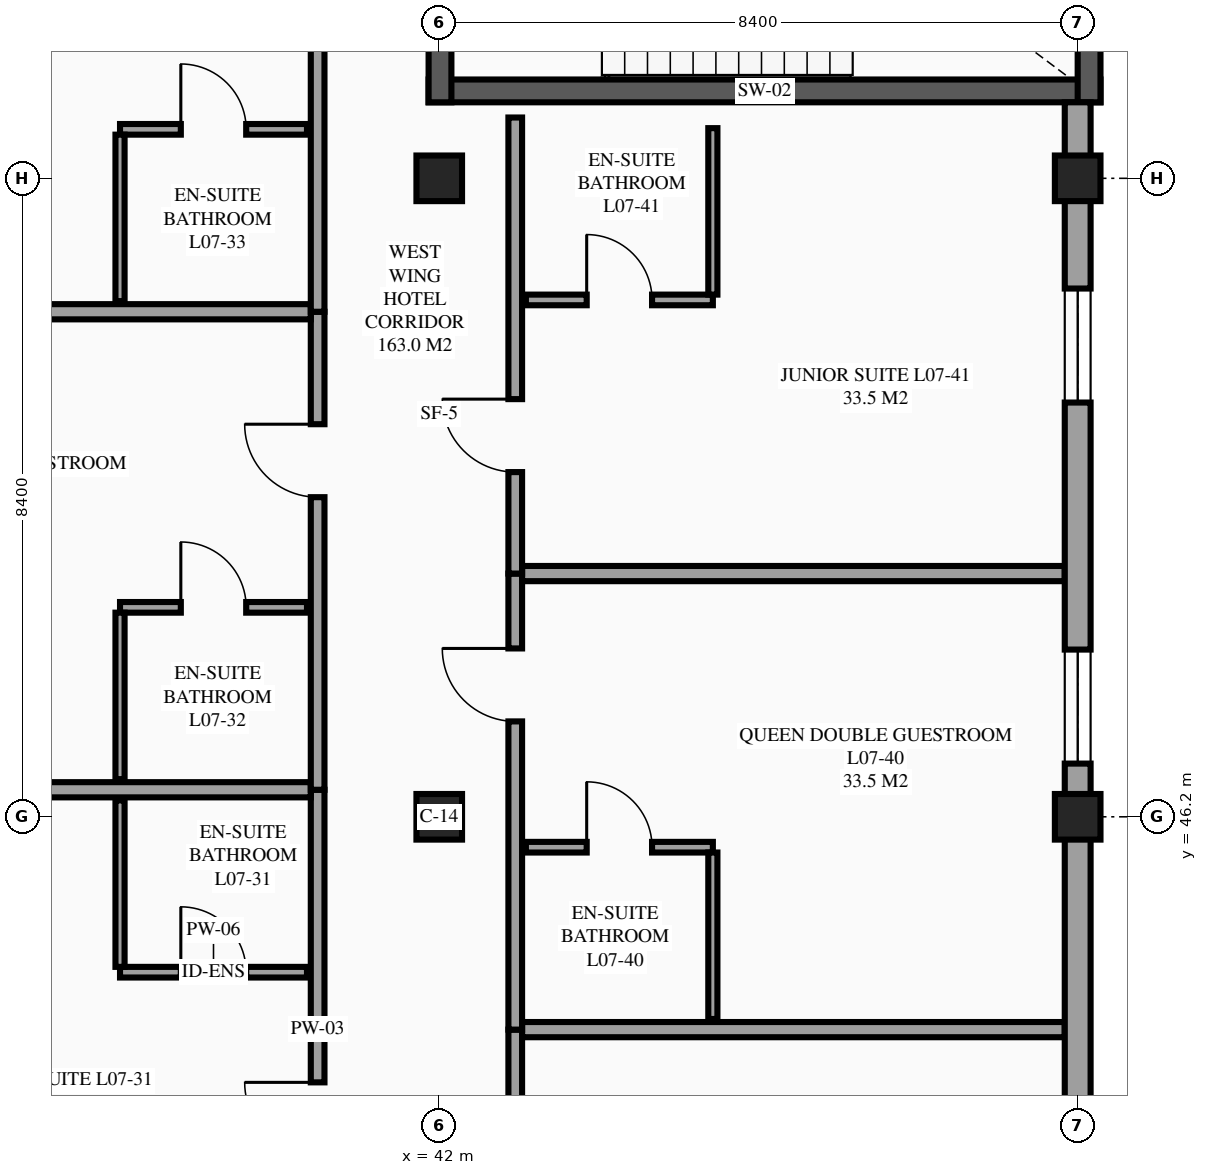
"""IFC4 building model, lengths in metres.
Left out: names, types, materials, properties, quantities, classifications, styles, units other than length and angle.
Written with IfcOpenShell. Run it as: python <this file> out.ifc"""

import sys

from ifc_helpers import new_model, si_unit, direction, frame, frame_2d, origin, origin_2d, place, context, subcontext, project, spatial, rectangle, extrude, element, fill, save


model = new_model("IFC4")
c1 = context("Model", 3, precision=1e-05, world=origin(), true_north=direction((0.0, 1.0)))
c2 = subcontext(c1, "Body", "Model", "MODEL_VIEW")
j1 = project(units=[si_unit("LENGTHUNIT", "METRE"), si_unit("PLANEANGLEUNIT", "RADIAN")], contexts=[c1])
p1 = place(None, origin())
s1 = spatial("IfcSite", under=j1, at=p1, CompositionType="ELEMENT")
p2 = place(p1, origin())
s2 = spatial("IfcBuilding", under=s1, at=p2, CompositionType="ELEMENT")
p3 = place(p2, frame((0.0, 0.0, 29.1)))
s3 = spatial("IfcBuildingStorey", under=s2, at=p3, CompositionType="ELEMENT", Elevation=29.1)
for number, where, z_axis, x_axis in (
    (1, (42.0, 46.2, 0.0), (0.0, 0.0, 1.0), (1.0, 0.0, 0.0)),
    (2, (42.0, 54.6, 0.0), (0.0, 0.0, 1.0), (1.0, 0.0, 0.0)),
    (3, (50.4, 46.2, 0.0), (0.0, 0.0, 1.0), (1.0, 0.0, 0.0)),
    (4, (50.4, 54.6, 0.0), (0.0, 0.0, 1.0), (1.0, 0.0, 0.0)),
):
    element("IfcColumn", number, at=place(p3, frame(where, z_axis=z_axis, x_axis=x_axis)), inside=s3, PredefinedType="COLUMN", context=c2, shape_type="SweptSolid", body=[
        extrude(rectangle(XDim=0.6, YDim=0.6, at=origin_2d()), origin(), (0.0, 0.0, 1.0), 3.6),
    ])
p4 = place(p3, frame((41.86, 55.75, 0.0), z_axis=(0.0, 0.0, 1.0), x_axis=(1.0, 0.0, 0.0)))
e5 = element("IfcWall", 5, at=p4, inside=s3, PredefinedType="SHEAR", context=c2, shape_type="SweptSolid", body=[
    extrude(rectangle(XDim=8.84, YDim=0.3, at=frame_2d((4.42, 0.0))), origin(), (0.0, 0.0, 1.0), 3.6),
])
p5 = place(p3, frame((50.55, 55.6, 0.0), z_axis=(0.0, 0.0, 1.0), x_axis=(0.0, 1.0, 0.0)))
e6 = element("IfcWall", 6, at=p5, inside=s3, PredefinedType="SHEAR", context=c2, shape_type="SweptSolid", body=[
    extrude(rectangle(XDim=5.2, YDim=0.3, at=frame_2d((2.6, 0.0))), origin(), (0.0, 0.0, 1.0), 3.6),
])
p6 = place(p3, frame((42.01, 60.8, 0.0), z_axis=(0.0, 0.0, 1.0), x_axis=(0.0, -1.0, 0.0)))
e7 = element("IfcWall", 7, at=p6, inside=s3, PredefinedType="SHEAR", context=c2, shape_type="SweptSolid", body=[
    extrude(rectangle(XDim=5.2, YDim=0.3, at=frame_2d((2.6, 0.0))), origin(), (0.0, 0.0, 1.0), 3.6),
])
p7 = place(p6, frame((3.0, 0.0, 0.0)))
e8 = element("IfcOpeningElement", 8, at=p7, cuts=e7, PredefinedType="OPENING", context=c2, shape_type="SweptSolid", body=[
    extrude(rectangle(XDim=1.15, YDim=2.15, at=frame_2d((0.575, 1.075))), frame((0.0, 0.16, 0.0), z_axis=(0.0, -1.0, 0.0), x_axis=(1.0, 0.0, 0.0)), (0.0, 0.0, 1.0), 0.32),
])
p8 = place(p3, frame((40.4, 40.267, 0.0), z_axis=(0.0, 0.0, 1.0), x_axis=(0.0, 1.0, 0.0)))
e9 = element("IfcWall", 9, at=p8, inside=s3, PredefinedType="PARTITIONING", context=c2, shape_type="SweptSolid", body=[
    extrude(rectangle(XDim=6.289, YDim=0.18, at=frame_2d((3.145, 0.0))), origin(), (0.0, 0.0, 1.0), 3.375),
])
p9 = place(p8, frame((1.479, 0.0, 0.0)))
e10 = element("IfcOpeningElement", 10, at=p9, cuts=e9, PredefinedType="OPENING", context=c2, shape_type="SweptSolid", body=[
    extrude(rectangle(XDim=0.96, YDim=2.15, at=frame_2d((0.48, 1.075))), frame((0.0, 0.1, 0.0), z_axis=(0.0, -1.0, 0.0), x_axis=(1.0, 0.0, 0.0)), (0.0, 0.0, 1.0), 0.2),
])
p10 = place(p3, frame((34.05, 46.556, 0.0), z_axis=(0.0, 0.0, 1.0), x_axis=(1.0, 0.0, 0.0)))
e11 = element("IfcWall", 11, at=p10, inside=s3, PredefinedType="PARTITIONING", context=c2, shape_type="SweptSolid", body=[
    extrude(rectangle(XDim=6.26, YDim=0.2, at=frame_2d((3.13, 0.0))), origin(), (0.0, 0.0, 1.0), 3.375),
])
p11 = place(p3, frame((37.8, 44.156, 0.0), z_axis=(0.0, 0.0, 1.0), x_axis=(1.0, 0.0, 0.0)))
e12 = element("IfcWall", 12, at=p11, inside=s3, PredefinedType="PARTITIONING", context=c2, shape_type="SweptSolid", body=[
    extrude(rectangle(XDim=2.46, YDim=0.14, at=frame_2d((1.23, 0.0))), origin(), (0.0, 0.0, 1.0), 3.375),
])
p12 = place(p11, frame((0.8, 0.0, 0.0)))
e13 = element("IfcOpeningElement", 13, at=p12, cuts=e12, PredefinedType="OPENING", context=c2, shape_type="SweptSolid", body=[
    extrude(rectangle(XDim=0.86, YDim=2.1, at=frame_2d((0.43, 1.05))), frame((0.0, 0.08, 0.0), z_axis=(0.0, -1.0, 0.0), x_axis=(1.0, 0.0, 0.0)), (0.0, 0.0, 1.0), 0.16),
])
p13 = place(p3, frame((37.8, 44.226, 0.0), z_axis=(0.0, 0.0, 1.0), x_axis=(0.0, 1.0, 0.0)))
e14 = element("IfcWall", 14, at=p13, inside=s3, PredefinedType="PARTITIONING", context=c2, shape_type="SweptSolid", body=[
    extrude(rectangle(XDim=2.19, YDim=0.12, at=frame_2d((1.095, 0.0))), origin(), (0.0, 0.0, 1.0), 3.375),
])
p14 = place(p3, frame((40.4, 46.556, 0.0), z_axis=(0.0, 0.0, 1.0), x_axis=(0.0, 1.0, 0.0)))
e15 = element("IfcWall", 15, at=p14, inside=s3, PredefinedType="PARTITIONING", context=c2, shape_type="SweptSolid", body=[
    extrude(rectangle(XDim=6.289, YDim=0.18, at=frame_2d((3.145, 0.0))), origin(), (0.0, 0.0, 1.0), 3.375),
])
p15 = place(p14, frame((3.849, 0.0, 0.0)))
e16 = element("IfcOpeningElement", 16, at=p15, cuts=e15, PredefinedType="OPENING", context=c2, shape_type="SweptSolid", body=[
    extrude(rectangle(XDim=0.96, YDim=2.15, at=frame_2d((0.48, 1.075))), frame((0.0, 0.1, 0.0), z_axis=(0.0, -1.0, 0.0), x_axis=(1.0, 0.0, 0.0)), (0.0, 0.0, 1.0), 0.2),
])
p16 = place(p3, frame((33.77, 52.844, 0.0), z_axis=(0.0, 0.0, 1.0), x_axis=(1.0, 0.0, 0.0)))
e17 = element("IfcWall", 17, at=p16, inside=s3, PredefinedType="PARTITIONING", context=c2, shape_type="SweptSolid", body=[
    extrude(rectangle(XDim=6.54, YDim=0.2, at=frame_2d((3.27, 0.0))), origin(), (0.0, 0.0, 1.0), 3.375),
])
p17 = place(p3, frame((37.8, 48.956, 0.0), z_axis=(0.0, 0.0, 1.0), x_axis=(1.0, 0.0, 0.0)))
e18 = element("IfcWall", 18, at=p17, inside=s3, PredefinedType="PARTITIONING", context=c2, shape_type="SweptSolid", body=[
    extrude(rectangle(XDim=2.46, YDim=0.14, at=frame_2d((1.23, 0.0))), origin(), (0.0, 0.0, 1.0), 3.375),
])
p18 = place(p17, frame((0.8, 0.0, 0.0)))
e19 = element("IfcOpeningElement", 19, at=p18, cuts=e18, PredefinedType="OPENING", context=c2, shape_type="SweptSolid", body=[
    extrude(rectangle(XDim=0.86, YDim=2.1, at=frame_2d((0.43, 1.05))), frame((0.0, 0.08, 0.0), z_axis=(0.0, -1.0, 0.0), x_axis=(1.0, 0.0, 0.0)), (0.0, 0.0, 1.0), 0.16),
])
p19 = place(p3, frame((37.8, 46.696, 0.0), z_axis=(0.0, 0.0, 1.0), x_axis=(0.0, 1.0, 0.0)))
e20 = element("IfcWall", 20, at=p19, inside=s3, PredefinedType="PARTITIONING", context=c2, shape_type="SweptSolid", body=[
    extrude(rectangle(XDim=2.19, YDim=0.12, at=frame_2d((1.095, 0.0))), origin(), (0.0, 0.0, 1.0), 3.375),
])
p20 = place(p3, frame((40.4, 52.844, 0.0), z_axis=(0.0, 0.0, 1.0), x_axis=(0.0, 1.0, 0.0)))
e21 = element("IfcWall", 21, at=p20, inside=s3, PredefinedType="PARTITIONING", context=c2, shape_type="SweptSolid", body=[
    extrude(rectangle(XDim=6.289, YDim=0.18, at=frame_2d((3.145, 0.0))), origin(), (0.0, 0.0, 1.0), 3.375),
])
p21 = place(p20, frame((3.85, 0.0, 0.0)))
e22 = element("IfcOpeningElement", 22, at=p21, cuts=e21, PredefinedType="OPENING", context=c2, shape_type="SweptSolid", body=[
    extrude(rectangle(XDim=0.96, YDim=2.15, at=frame_2d((0.48, 1.075))), frame((0.0, 0.1, 0.0), z_axis=(0.0, -1.0, 0.0), x_axis=(1.0, 0.0, 0.0)), (0.0, 0.0, 1.0), 0.2),
])
p22 = place(p3, frame((37.8, 55.244, 0.0), z_axis=(0.0, 0.0, 1.0), x_axis=(1.0, 0.0, 0.0)))
e23 = element("IfcWall", 23, at=p22, inside=s3, PredefinedType="PARTITIONING", context=c2, shape_type="SweptSolid", body=[
    extrude(rectangle(XDim=2.46, YDim=0.14, at=frame_2d((1.23, 0.0))), origin(), (0.0, 0.0, 1.0), 3.375),
])
p23 = place(p22, frame((0.8, 0.0, 0.0)))
e24 = element("IfcOpeningElement", 24, at=p23, cuts=e23, PredefinedType="OPENING", context=c2, shape_type="SweptSolid", body=[
    extrude(rectangle(XDim=0.86, YDim=2.1, at=frame_2d((0.43, 1.05))), frame((0.0, 0.08, 0.0), z_axis=(0.0, -1.0, 0.0), x_axis=(1.0, 0.0, 0.0)), (0.0, 0.0, 1.0), 0.16),
])
p24 = place(p3, frame((37.8, 52.984, 0.0), z_axis=(0.0, 0.0, 1.0), x_axis=(0.0, 1.0, 0.0)))
e25 = element("IfcWall", 25, at=p24, inside=s3, PredefinedType="PARTITIONING", context=c2, shape_type="SweptSolid", body=[
    extrude(rectangle(XDim=2.19, YDim=0.12, at=frame_2d((1.095, 0.0))), origin(), (0.0, 0.0, 1.0), 3.375),
])
p25 = place(p3, frame((43.0, 37.4, 0.0), z_axis=(0.0, 0.0, 1.0), x_axis=(0.0, 1.0, 0.0)))
e26 = element("IfcWall", 26, at=p25, inside=s3, PredefinedType="PARTITIONING", context=c2, shape_type="SweptSolid", body=[
    extrude(rectangle(XDim=6.0, YDim=0.18, at=frame_2d((3.0, 0.0))), origin(), (0.0, 0.0, 1.0), 3.375),
])
p26 = place(p25, frame((3.705, 0.0, 0.0)))
e27 = element("IfcOpeningElement", 27, at=p26, cuts=e26, PredefinedType="OPENING", context=c2, shape_type="SweptSolid", body=[
    extrude(rectangle(XDim=0.96, YDim=2.15, at=frame_2d((0.48, 1.075))), frame((0.0, 0.1, 0.0), z_axis=(0.0, -1.0, 0.0), x_axis=(1.0, 0.0, 0.0)), (0.0, 0.0, 1.0), 0.2),
])
p27 = place(p3, frame((43.09, 43.4, 0.0), z_axis=(0.0, 0.0, 1.0), x_axis=(1.0, 0.0, 0.0)))
e28 = element("IfcWall", 28, at=p27, inside=s3, PredefinedType="PARTITIONING", context=c2, shape_type="SweptSolid", body=[
    extrude(rectangle(XDim=7.14, YDim=0.2, at=frame_2d((3.57, 0.0))), origin(), (0.0, 0.0, 1.0), 3.375),
])
p28 = place(p3, frame((43.0, 43.4, 0.0), z_axis=(0.0, 0.0, 1.0), x_axis=(0.0, 1.0, 0.0)))
e29 = element("IfcWall", 29, at=p28, inside=s3, PredefinedType="PARTITIONING", context=c2, shape_type="SweptSolid", body=[
    extrude(rectangle(XDim=6.0, YDim=0.18, at=frame_2d((3.0, 0.0))), origin(), (0.0, 0.0, 1.0), 3.375),
])
p29 = place(p28, frame((4.055, 0.0, 0.0)))
e30 = element("IfcOpeningElement", 30, at=p29, cuts=e29, PredefinedType="OPENING", context=c2, shape_type="SweptSolid", body=[
    extrude(rectangle(XDim=0.96, YDim=2.15, at=frame_2d((0.48, 1.075))), frame((0.0, 0.1, 0.0), z_axis=(0.0, -1.0, 0.0), x_axis=(1.0, 0.0, 0.0)), (0.0, 0.0, 1.0), 0.2),
])
p30 = place(p3, frame((43.09, 49.4, 0.0), z_axis=(0.0, 0.0, 1.0), x_axis=(1.0, 0.0, 0.0)))
e31 = element("IfcWall", 31, at=p30, inside=s3, PredefinedType="PARTITIONING", context=c2, shape_type="SweptSolid", body=[
    extrude(rectangle(XDim=7.14, YDim=0.2, at=frame_2d((3.57, 0.0))), origin(), (0.0, 0.0, 1.0), 3.375),
])
p31 = place(p3, frame((43.14, 45.8, 0.0), z_axis=(0.0, 0.0, 1.0), x_axis=(1.0, 0.0, 0.0)))
e32 = element("IfcWall", 32, at=p31, inside=s3, PredefinedType="PARTITIONING", context=c2, shape_type="SweptSolid", body=[
    extrude(rectangle(XDim=2.46, YDim=0.14, at=frame_2d((1.23, 0.0))), origin(), (0.0, 0.0, 1.0), 3.375),
])
p32 = place(p31, frame((0.8, 0.0, 0.0)))
e33 = element("IfcOpeningElement", 33, at=p32, cuts=e32, PredefinedType="OPENING", context=c2, shape_type="SweptSolid", body=[
    extrude(rectangle(XDim=0.86, YDim=2.1, at=frame_2d((0.43, 1.05))), frame((0.0, 0.08, 0.0), z_axis=(0.0, -1.0, 0.0), x_axis=(1.0, 0.0, 0.0)), (0.0, 0.0, 1.0), 0.16),
])
p33 = place(p3, frame((45.6, 43.54, 0.0), z_axis=(0.0, 0.0, 1.0), x_axis=(0.0, 1.0, 0.0)))
e34 = element("IfcWall", 34, at=p33, inside=s3, PredefinedType="PARTITIONING", context=c2, shape_type="SweptSolid", body=[
    extrude(rectangle(XDim=2.19, YDim=0.12, at=frame_2d((1.095, 0.0))), origin(), (0.0, 0.0, 1.0), 3.375),
])
p34 = place(p3, frame((43.0, 49.4, 0.0), z_axis=(0.0, 0.0, 1.0), x_axis=(0.0, 1.0, 0.0)))
e35 = element("IfcWall", 35, at=p34, inside=s3, PredefinedType="PARTITIONING", context=c2, shape_type="SweptSolid", body=[
    extrude(rectangle(XDim=6.0, YDim=0.18, at=frame_2d((3.0, 0.0))), origin(), (0.0, 0.0, 1.0), 3.375),
])
p35 = place(p34, frame((1.335, 0.0, 0.0)))
e36 = element("IfcOpeningElement", 36, at=p35, cuts=e35, PredefinedType="OPENING", context=c2, shape_type="SweptSolid", body=[
    extrude(rectangle(XDim=0.96, YDim=2.15, at=frame_2d((0.48, 1.075))), frame((0.0, 0.1, 0.0), z_axis=(0.0, -1.0, 0.0), x_axis=(1.0, 0.0, 0.0)), (0.0, 0.0, 1.0), 0.2),
])
p36 = place(p3, frame((43.14, 53.0, 0.0), z_axis=(0.0, 0.0, 1.0), x_axis=(1.0, 0.0, 0.0)))
e37 = element("IfcWall", 37, at=p36, inside=s3, PredefinedType="PARTITIONING", context=c2, shape_type="SweptSolid", body=[
    extrude(rectangle(XDim=2.46, YDim=0.14, at=frame_2d((1.23, 0.0))), origin(), (0.0, 0.0, 1.0), 3.375),
])
p37 = place(p36, frame((0.8, 0.0, 0.0)))
e38 = element("IfcOpeningElement", 38, at=p37, cuts=e37, PredefinedType="OPENING", context=c2, shape_type="SweptSolid", body=[
    extrude(rectangle(XDim=0.86, YDim=2.1, at=frame_2d((0.43, 1.05))), frame((0.0, 0.08, 0.0), z_axis=(0.0, -1.0, 0.0), x_axis=(1.0, 0.0, 0.0)), (0.0, 0.0, 1.0), 0.16),
])
p38 = place(p3, frame((45.6, 53.07, 0.0), z_axis=(0.0, 0.0, 1.0), x_axis=(0.0, 1.0, 0.0)))
e39 = element("IfcWall", 39, at=p38, inside=s3, PredefinedType="PARTITIONING", context=c2, shape_type="SweptSolid", body=[
    extrude(rectangle(XDim=2.19, YDim=0.12, at=frame_2d((1.095, 0.0))), origin(), (0.0, 0.0, 1.0), 3.375),
])
p39 = place(p3, frame((50.4, 37.8, 0.0), z_axis=(0.0, 0.0, 1.0), x_axis=(0.0, 1.0, 0.0)))
e40 = element("IfcWall", 40, at=p39, inside=s3, PredefinedType="STANDARD", context=c2, shape_type="SweptSolid", body=[
    extrude(rectangle(XDim=8.4, YDim=0.34, at=frame_2d((4.2, 0.0))), origin(), (0.0, 0.0, 1.0), 2.88),
])
p40 = place(p39, frame((1.85, 0.0, 0.85)))
e41 = element("IfcOpeningElement", 41, at=p40, cuts=e40, PredefinedType="OPENING", context=c2, shape_type="SweptSolid", body=[
    extrude(rectangle(XDim=1.5, YDim=1.5, at=frame_2d((0.75, 0.75))), frame((0.0, 0.18, 0.0), z_axis=(0.0, -1.0, 0.0), x_axis=(1.0, 0.0, 0.0)), (0.0, 0.0, 1.0), 0.36),
])
p41 = place(p3, frame((50.4, 46.2, 0.0), z_axis=(0.0, 0.0, 1.0), x_axis=(0.0, 1.0, 0.0)))
e42 = element("IfcWall", 42, at=p41, inside=s3, PredefinedType="STANDARD", context=c2, shape_type="SweptSolid", body=[
    extrude(rectangle(XDim=9.4, YDim=0.34, at=frame_2d((4.7, 0.0))), origin(), (0.0, 0.0, 1.0), 2.48),
])
p42 = place(p41, frame((0.7, 0.0, 0.85)))
e43 = element("IfcOpeningElement", 43, at=p42, cuts=e42, PredefinedType="OPENING", context=c2, shape_type="SweptSolid", body=[
    extrude(rectangle(XDim=1.5, YDim=1.5, at=frame_2d((0.75, 0.75))), frame((0.0, 0.18, 0.0), z_axis=(0.0, -1.0, 0.0), x_axis=(1.0, 0.0, 0.0)), (0.0, 0.0, 1.0), 0.36),
])
p43 = place(p41, frame((5.45, 0.0, 0.85)))
e44 = element("IfcOpeningElement", 44, at=p43, cuts=e42, PredefinedType="OPENING", context=c2, shape_type="SweptSolid", body=[
    extrude(rectangle(XDim=1.5, YDim=1.5, at=frame_2d((0.75, 0.75))), frame((0.0, 0.18, 0.0), z_axis=(0.0, -1.0, 0.0), x_axis=(1.0, 0.0, 0.0)), (0.0, 0.0, 1.0), 0.36),
])
p44 = place(p42, origin())
e45 = element("IfcWindow", 45, at=p44, inside=s3, PartitioningType="SINGLE_PANEL", PredefinedType="WINDOW", context=c2, shape_type="SweptSolid", body=[
    extrude(rectangle(XDim=1.5, YDim=1.5, at=frame_2d((0.75, 0.75))), frame((0.0, 0.03, 0.0), z_axis=(0.0, -1.0, 0.0), x_axis=(1.0, 0.0, 0.0)), (0.0, 0.0, 1.0), 0.06),
])
fill(e43, e45)
p45 = place(p43, origin())
e46 = element("IfcWindow", 46, at=p45, inside=s3, PartitioningType="SINGLE_PANEL", PredefinedType="WINDOW", context=c2, shape_type="SweptSolid", body=[
    extrude(rectangle(XDim=1.5, YDim=1.5, at=frame_2d((0.75, 0.75))), frame((0.0, 0.03, 0.0), z_axis=(0.0, -1.0, 0.0), x_axis=(1.0, 0.0, 0.0)), (0.0, 0.0, 1.0), 0.06),
])
fill(e44, e46)
p46 = place(p9, origin())
e47 = element("IfcDoor", 47, at=p46, inside=s3, OperationType="SINGLE_SWING_RIGHT", PredefinedType="DOOR", context=c2, shape_type="SweptSolid", body=[
    extrude(rectangle(XDim=0.96, YDim=2.15, at=frame_2d((0.48, 1.075))), frame((0.0, 0.025, 0.0), z_axis=(0.0, -1.0, 0.0), x_axis=(1.0, 0.0, 0.0)), (0.0, 0.0, 1.0), 0.05),
])
fill(e10, e47)
p47 = place(p12, origin())
e48 = element("IfcDoor", 48, at=p47, inside=s3, OperationType="SINGLE_SWING_LEFT", PredefinedType="DOOR", context=c2, shape_type="SweptSolid", body=[
    extrude(rectangle(XDim=0.86, YDim=2.1, at=frame_2d((0.43, 1.05))), frame((0.0, 0.025, 0.0), z_axis=(0.0, -1.0, 0.0), x_axis=(1.0, 0.0, 0.0)), (0.0, 0.0, 1.0), 0.05),
])
fill(e13, e48)
p48 = place(p15, origin())
e49 = element("IfcDoor", 49, at=p48, inside=s3, OperationType="SINGLE_SWING_RIGHT", PredefinedType="DOOR", context=c2, shape_type="SweptSolid", body=[
    extrude(rectangle(XDim=0.96, YDim=2.15, at=frame_2d((0.48, 1.075))), frame((0.0, 0.025, 0.0), z_axis=(0.0, -1.0, 0.0), x_axis=(1.0, 0.0, 0.0)), (0.0, 0.0, 1.0), 0.05),
])
fill(e16, e49)
p49 = place(p18, origin())
e50 = element("IfcDoor", 50, at=p49, inside=s3, OperationType="SINGLE_SWING_LEFT", PredefinedType="DOOR", context=c2, shape_type="SweptSolid", body=[
    extrude(rectangle(XDim=0.86, YDim=2.1, at=frame_2d((0.43, 1.05))), frame((0.0, 0.025, 0.0), z_axis=(0.0, -1.0, 0.0), x_axis=(1.0, 0.0, 0.0)), (0.0, 0.0, 1.0), 0.05),
])
fill(e19, e50)
p50 = place(p23, origin())
e51 = element("IfcDoor", 51, at=p50, inside=s3, OperationType="SINGLE_SWING_LEFT", PredefinedType="DOOR", context=c2, shape_type="SweptSolid", body=[
    extrude(rectangle(XDim=0.86, YDim=2.1, at=frame_2d((0.43, 1.05))), frame((0.0, 0.025, 0.0), z_axis=(0.0, -1.0, 0.0), x_axis=(1.0, 0.0, 0.0)), (0.0, 0.0, 1.0), 0.05),
])
fill(e24, e51)
p51 = place(p29, origin())
e52 = element("IfcDoor", 52, at=p51, inside=s3, OperationType="SINGLE_SWING_RIGHT", PredefinedType="DOOR", context=c2, shape_type="SweptSolid", body=[
    extrude(rectangle(XDim=0.96, YDim=2.15, at=frame_2d((0.48, 1.075))), frame((0.0, 0.025, 0.0), z_axis=(0.0, -1.0, 0.0), x_axis=(1.0, 0.0, 0.0)), (0.0, 0.0, 1.0), 0.05),
])
fill(e30, e52)
p52 = place(p32, origin())
e53 = element("IfcDoor", 53, at=p52, inside=s3, OperationType="SINGLE_SWING_LEFT", PredefinedType="DOOR", context=c2, shape_type="SweptSolid", body=[
    extrude(rectangle(XDim=0.86, YDim=2.1, at=frame_2d((0.43, 1.05))), frame((0.0, 0.025, 0.0), z_axis=(0.0, -1.0, 0.0), x_axis=(1.0, 0.0, 0.0)), (0.0, 0.0, 1.0), 0.05),
])
fill(e33, e53)
p53 = place(p35, origin())
e54 = element("IfcDoor", 54, at=p53, inside=s3, OperationType="SINGLE_SWING_RIGHT", PredefinedType="DOOR", context=c2, shape_type="SweptSolid", body=[
    extrude(rectangle(XDim=0.96, YDim=2.15, at=frame_2d((0.48, 1.075))), frame((0.0, 0.025, 0.0), z_axis=(0.0, -1.0, 0.0), x_axis=(1.0, 0.0, 0.0)), (0.0, 0.0, 1.0), 0.05),
])
fill(e36, e54)
p54 = place(p37, origin())
e55 = element("IfcDoor", 55, at=p54, inside=s3, OperationType="SINGLE_SWING_LEFT", PredefinedType="DOOR", context=c2, shape_type="SweptSolid", body=[
    extrude(rectangle(XDim=0.86, YDim=2.1, at=frame_2d((0.43, 1.05))), frame((0.0, 0.025, 0.0), z_axis=(0.0, -1.0, 0.0), x_axis=(1.0, 0.0, 0.0)), (0.0, 0.0, 1.0), 0.05),
])
fill(e38, e55)
save(model, sys.argv[1])
